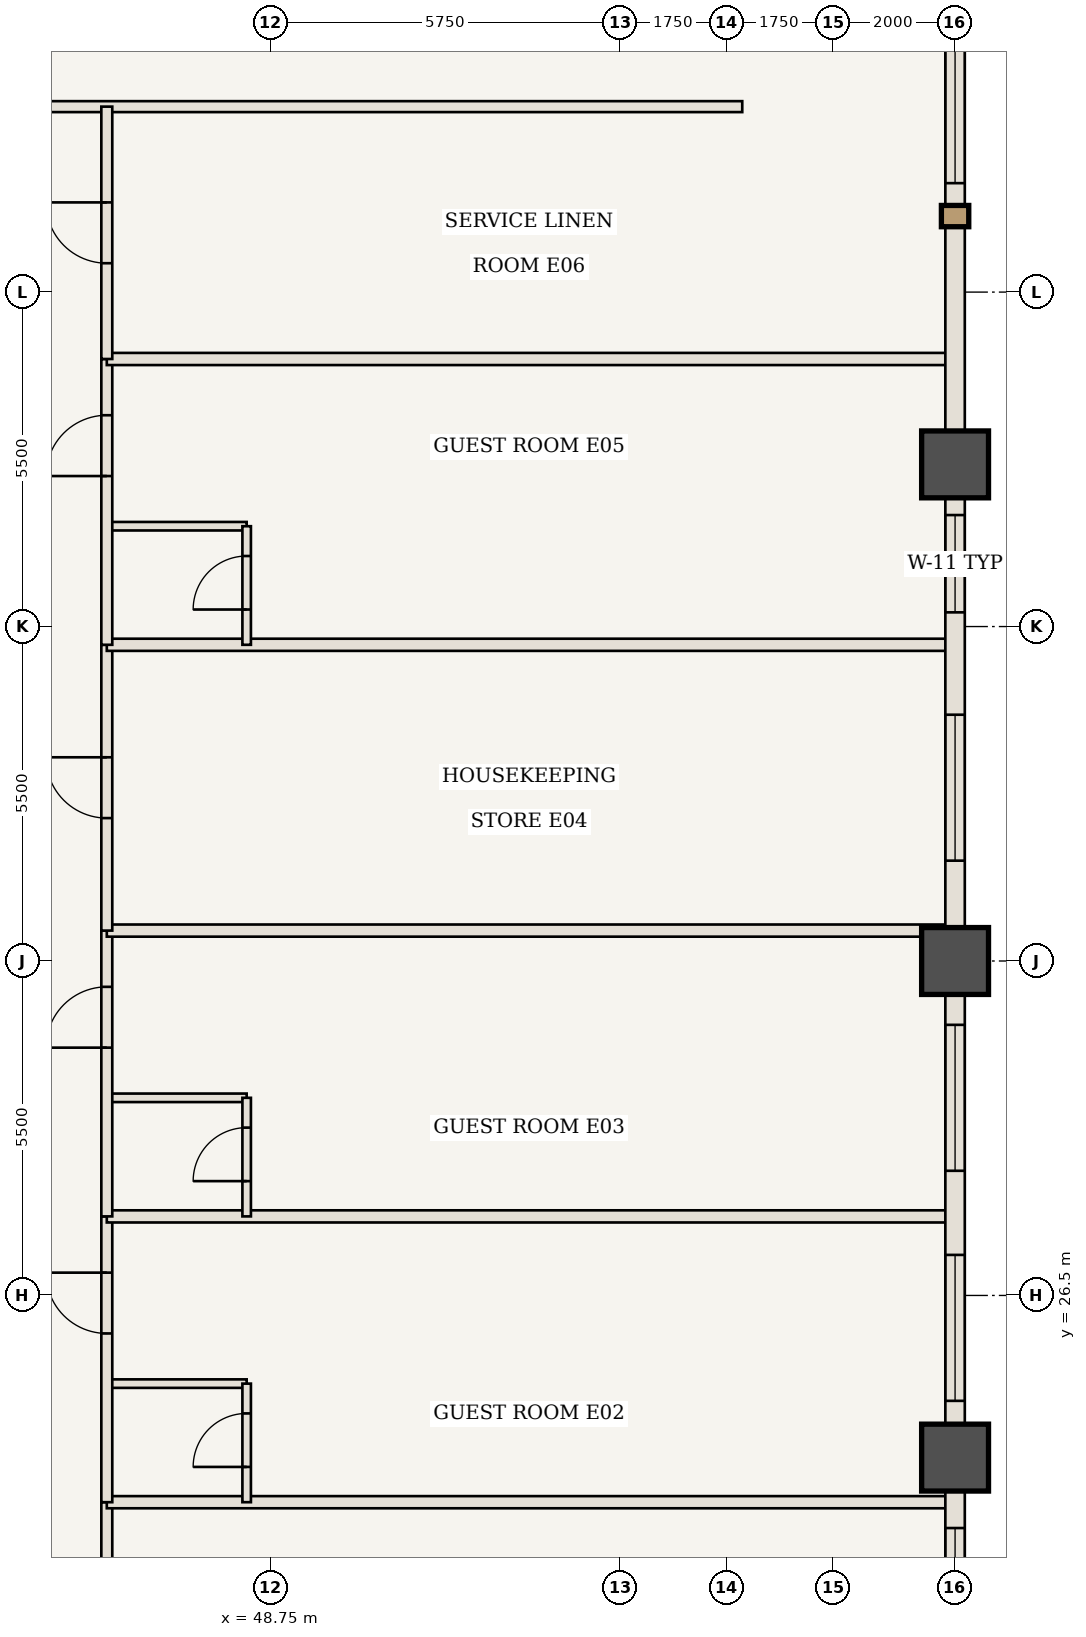
"""IFC4 building model, lengths in metres.
Left out: names, types, materials, properties, quantities, classifications, styles, units other than length and angle.
Written with IfcOpenShell. Run it as: python <this file> out.ifc"""

import sys

from ifc_helpers import new_model, si_unit, direction, frame, frame_2d, origin, origin_2d, place, context, subcontext, project, spatial, rectangle, extrude, element, fill, save


model = new_model("IFC4")
c1 = context("Model", 3, precision=1e-05, world=origin(), true_north=direction((0.0, 1.0)))
c2 = subcontext(c1, "Body", "Model", "MODEL_VIEW")
j1 = project(units=[si_unit("LENGTHUNIT", "METRE"), si_unit("PLANEANGLEUNIT", "RADIAN")], contexts=[c1])
p1 = place(None, origin())
s1 = spatial("IfcSite", under=j1, at=p1, CompositionType="ELEMENT")
p2 = place(p1, origin())
s2 = spatial("IfcBuilding", under=s1, at=p2, CompositionType="ELEMENT")
p3 = place(p2, frame((0.0, 0.0, 70.35)))
s3 = spatial("IfcBuildingStorey", under=s2, at=p3, CompositionType="ELEMENT", Elevation=70.35)
for number, where, z_axis, x_axis in (
    (1, (60.0, 23.833, 0.0), (0.0, 0.0, 1.0), (1.0, 0.0, 0.0)),
    (2, (60.0, 32.0, 0.0), (0.0, 0.0, 1.0), (1.0, 0.0, 0.0)),
    (3, (60.0, 40.167, 0.0), (0.0, 0.0, 1.0), (1.0, 0.0, 0.0)),
):
    element("IfcColumn", number, at=place(p3, frame(where, z_axis=z_axis, x_axis=x_axis)), inside=s3, PredefinedType="COLUMN", context=c2, shape_type="SweptSolid", body=[
        extrude(rectangle(XDim=1.1, YDim=1.1, at=origin_2d()), origin(), (0.0, 0.0, 1.0), 3.5),
    ])
p4 = place(p3, frame((33.8, 46.05, 0.0), z_axis=(0.0, 0.0, 1.0), x_axis=(1.0, 0.0, 0.0)))
e4 = element("IfcWall", 4, at=p4, inside=s3, PredefinedType="STANDARD", context=c2, shape_type="SweptSolid", body=[
    extrude(rectangle(XDim=22.7, YDim=0.18, at=frame_2d((11.35, 0.0))), origin(), (0.0, 0.0, 1.0), 3.32),
])
p5 = place(p4, frame((5.6, 0.0, 0.0)))
e5 = element("IfcOpeningElement", 5, at=p5, cuts=e4, PredefinedType="OPENING", context=c2, shape_type="SweptSolid", body=[
    extrude(rectangle(XDim=1.0, YDim=2.15, at=frame_2d((0.5, 1.075))), frame((0.0, 0.1, 0.0), z_axis=(0.0, -1.0, 0.0), x_axis=(1.0, 0.0, 0.0)), (0.0, 0.0, 1.0), 0.2),
])
p6 = place(p3, frame((46.05, 17.95, 0.0), z_axis=(0.0, 0.0, 1.0), x_axis=(0.0, 1.0, 0.0)))
e6 = element("IfcWall", 6, at=p6, inside=s3, PredefinedType="STANDARD", context=c2, shape_type="SweptSolid", body=[
    extrude(rectangle(XDim=5.15, YDim=0.18, at=frame_2d((2.575, 0.0))), origin(), (0.0, 0.0, 1.0), 3.32),
])
p7 = place(p6, frame((3.0, 0.0, 0.0)))
e7 = element("IfcOpeningElement", 7, at=p7, cuts=e6, PredefinedType="OPENING", context=c2, shape_type="SweptSolid", body=[
    extrude(rectangle(XDim=1.0, YDim=2.15, at=frame_2d((0.5, 1.075))), frame((0.0, 0.1, 0.0), z_axis=(0.0, -1.0, 0.0), x_axis=(1.0, 0.0, 0.0)), (0.0, 0.0, 1.0), 0.2),
])
p8 = place(p3, frame((46.05, 23.1, 0.0), z_axis=(0.0, 0.0, 1.0), x_axis=(1.0, 0.0, 0.0)))
e8 = element("IfcWall", 8, at=p8, inside=s3, PredefinedType="STANDARD", context=c2, shape_type="SweptSolid", body=[
    extrude(rectangle(XDim=13.89, YDim=0.2, at=frame_2d((6.945, 0.0))), origin(), (0.0, 0.0, 1.0), 3.32),
])
p9 = place(p3, frame((46.05, 25.05, 0.0), z_axis=(0.0, 0.0, 1.0), x_axis=(1.0, 0.0, 0.0)))
e9 = element("IfcWall", 9, at=p9, inside=s3, PredefinedType="STANDARD", context=c2, shape_type="SweptSolid", body=[
    extrude(rectangle(XDim=2.3, YDim=0.14, at=frame_2d((1.15, 0.0))), origin(), (0.0, 0.0, 1.0), 3.32),
])
p10 = place(p3, frame((48.35, 23.1, 0.0), z_axis=(0.0, 0.0, 1.0), x_axis=(0.0, 1.0, 0.0)))
e10 = element("IfcWall", 10, at=p10, inside=s3, PredefinedType="STANDARD", context=c2, shape_type="SweptSolid", body=[
    extrude(rectangle(XDim=1.95, YDim=0.14, at=frame_2d((0.975, 0.0))), origin(), (0.0, 0.0, 1.0), 3.32),
])
p11 = place(p10, frame((0.58, 0.0, 0.0)))
e11 = element("IfcOpeningElement", 11, at=p11, cuts=e10, PredefinedType="OPENING", context=c2, shape_type="SweptSolid", body=[
    extrude(rectangle(XDim=0.88, YDim=2.1, at=frame_2d((0.44, 1.05))), frame((0.0, 0.08, 0.0), z_axis=(0.0, -1.0, 0.0), x_axis=(1.0, 0.0, 0.0)), (0.0, 0.0, 1.0), 0.16),
])
p12 = place(p3, frame((46.05, 23.1, 0.0), z_axis=(0.0, 0.0, 1.0), x_axis=(0.0, 1.0, 0.0)))
e12 = element("IfcWall", 12, at=p12, inside=s3, PredefinedType="STANDARD", context=c2, shape_type="SweptSolid", body=[
    extrude(rectangle(XDim=4.7, YDim=0.18, at=frame_2d((2.35, 0.0))), origin(), (0.0, 0.0, 1.0), 3.32),
])
p13 = place(p12, frame((2.775, 0.0, 0.0)))
e13 = element("IfcOpeningElement", 13, at=p13, cuts=e12, PredefinedType="OPENING", context=c2, shape_type="SweptSolid", body=[
    extrude(rectangle(XDim=1.0, YDim=2.15, at=frame_2d((0.5, 1.075))), frame((0.0, 0.1, 0.0), z_axis=(0.0, -1.0, 0.0), x_axis=(1.0, 0.0, 0.0)), (0.0, 0.0, 1.0), 0.2),
])
p14 = place(p3, frame((46.05, 27.8, 0.0), z_axis=(0.0, 0.0, 1.0), x_axis=(1.0, 0.0, 0.0)))
e14 = element("IfcWall", 14, at=p14, inside=s3, PredefinedType="STANDARD", context=c2, shape_type="SweptSolid", body=[
    extrude(rectangle(XDim=13.89, YDim=0.2, at=frame_2d((6.945, 0.0))), origin(), (0.0, 0.0, 1.0), 3.32),
])
p15 = place(p3, frame((46.05, 29.75, 0.0), z_axis=(0.0, 0.0, 1.0), x_axis=(1.0, 0.0, 0.0)))
e15 = element("IfcWall", 15, at=p15, inside=s3, PredefinedType="STANDARD", context=c2, shape_type="SweptSolid", body=[
    extrude(rectangle(XDim=2.3, YDim=0.14, at=frame_2d((1.15, 0.0))), origin(), (0.0, 0.0, 1.0), 3.32),
])
p16 = place(p3, frame((48.35, 27.8, 0.0), z_axis=(0.0, 0.0, 1.0), x_axis=(0.0, 1.0, 0.0)))
e16 = element("IfcWall", 16, at=p16, inside=s3, PredefinedType="STANDARD", context=c2, shape_type="SweptSolid", body=[
    extrude(rectangle(XDim=1.95, YDim=0.14, at=frame_2d((0.975, 0.0))), origin(), (0.0, 0.0, 1.0), 3.32),
])
p17 = place(p16, frame((0.58, 0.0, 0.0)))
e17 = element("IfcOpeningElement", 17, at=p17, cuts=e16, PredefinedType="OPENING", context=c2, shape_type="SweptSolid", body=[
    extrude(rectangle(XDim=0.88, YDim=2.1, at=frame_2d((0.44, 1.05))), frame((0.0, 0.08, 0.0), z_axis=(0.0, -1.0, 0.0), x_axis=(1.0, 0.0, 0.0)), (0.0, 0.0, 1.0), 0.16),
])
p18 = place(p3, frame((46.05, 27.8, 0.0), z_axis=(0.0, 0.0, 1.0), x_axis=(0.0, 1.0, 0.0)))
e18 = element("IfcWall", 18, at=p18, inside=s3, PredefinedType="STANDARD", context=c2, shape_type="SweptSolid", body=[
    extrude(rectangle(XDim=4.7, YDim=0.18, at=frame_2d((2.35, 0.0))), origin(), (0.0, 0.0, 1.0), 3.32),
])
p19 = place(p18, frame((2.775, 0.0, 0.0)))
e19 = element("IfcOpeningElement", 19, at=p19, cuts=e18, PredefinedType="OPENING", context=c2, shape_type="SweptSolid", body=[
    extrude(rectangle(XDim=1.0, YDim=2.15, at=frame_2d((0.5, 1.075))), frame((0.0, 0.1, 0.0), z_axis=(0.0, -1.0, 0.0), x_axis=(1.0, 0.0, 0.0)), (0.0, 0.0, 1.0), 0.2),
])
p20 = place(p3, frame((46.05, 32.5, 0.0), z_axis=(0.0, 0.0, 1.0), x_axis=(1.0, 0.0, 0.0)))
e20 = element("IfcWall", 20, at=p20, inside=s3, PredefinedType="STANDARD", context=c2, shape_type="SweptSolid", body=[
    extrude(rectangle(XDim=13.89, YDim=0.2, at=frame_2d((6.945, 0.0))), origin(), (0.0, 0.0, 1.0), 3.32),
])
p21 = place(p3, frame((46.05, 32.5, 0.0), z_axis=(0.0, 0.0, 1.0), x_axis=(0.0, 1.0, 0.0)))
e21 = element("IfcWall", 21, at=p21, inside=s3, PredefinedType="STANDARD", context=c2, shape_type="SweptSolid", body=[
    extrude(rectangle(XDim=4.7, YDim=0.18, at=frame_2d((2.35, 0.0))), origin(), (0.0, 0.0, 1.0), 3.32),
])
p22 = place(p21, frame((1.85, 0.0, 0.0)))
e22 = element("IfcOpeningElement", 22, at=p22, cuts=e21, PredefinedType="OPENING", context=c2, shape_type="SweptSolid", body=[
    extrude(rectangle(XDim=1.0, YDim=2.15, at=frame_2d((0.5, 1.075))), frame((0.0, 0.1, 0.0), z_axis=(0.0, -1.0, 0.0), x_axis=(1.0, 0.0, 0.0)), (0.0, 0.0, 1.0), 0.2),
])
p23 = place(p3, frame((46.05, 37.2, 0.0), z_axis=(0.0, 0.0, 1.0), x_axis=(1.0, 0.0, 0.0)))
e23 = element("IfcWall", 23, at=p23, inside=s3, PredefinedType="STANDARD", context=c2, shape_type="SweptSolid", body=[
    extrude(rectangle(XDim=13.89, YDim=0.2, at=frame_2d((6.945, 0.0))), origin(), (0.0, 0.0, 1.0), 3.32),
])
p24 = place(p3, frame((46.05, 39.15, 0.0), z_axis=(0.0, 0.0, 1.0), x_axis=(1.0, 0.0, 0.0)))
e24 = element("IfcWall", 24, at=p24, inside=s3, PredefinedType="STANDARD", context=c2, shape_type="SweptSolid", body=[
    extrude(rectangle(XDim=2.3, YDim=0.14, at=frame_2d((1.15, 0.0))), origin(), (0.0, 0.0, 1.0), 3.32),
])
p25 = place(p3, frame((48.35, 37.2, 0.0), z_axis=(0.0, 0.0, 1.0), x_axis=(0.0, 1.0, 0.0)))
e25 = element("IfcWall", 25, at=p25, inside=s3, PredefinedType="STANDARD", context=c2, shape_type="SweptSolid", body=[
    extrude(rectangle(XDim=1.95, YDim=0.14, at=frame_2d((0.975, 0.0))), origin(), (0.0, 0.0, 1.0), 3.32),
])
p26 = place(p25, frame((0.58, 0.0, 0.0)))
e26 = element("IfcOpeningElement", 26, at=p26, cuts=e25, PredefinedType="OPENING", context=c2, shape_type="SweptSolid", body=[
    extrude(rectangle(XDim=0.88, YDim=2.1, at=frame_2d((0.44, 1.05))), frame((0.0, 0.08, 0.0), z_axis=(0.0, -1.0, 0.0), x_axis=(1.0, 0.0, 0.0)), (0.0, 0.0, 1.0), 0.16),
])
p27 = place(p3, frame((46.05, 37.2, 0.0), z_axis=(0.0, 0.0, 1.0), x_axis=(0.0, 1.0, 0.0)))
e27 = element("IfcWall", 27, at=p27, inside=s3, PredefinedType="STANDARD", context=c2, shape_type="SweptSolid", body=[
    extrude(rectangle(XDim=4.7, YDim=0.18, at=frame_2d((2.35, 0.0))), origin(), (0.0, 0.0, 1.0), 3.32),
])
p28 = place(p27, frame((2.775, 0.0, 0.0)))
e28 = element("IfcOpeningElement", 28, at=p28, cuts=e27, PredefinedType="OPENING", context=c2, shape_type="SweptSolid", body=[
    extrude(rectangle(XDim=1.0, YDim=2.15, at=frame_2d((0.5, 1.075))), frame((0.0, 0.1, 0.0), z_axis=(0.0, -1.0, 0.0), x_axis=(1.0, 0.0, 0.0)), (0.0, 0.0, 1.0), 0.2),
])
p29 = place(p3, frame((46.05, 41.9, 0.0), z_axis=(0.0, 0.0, 1.0), x_axis=(1.0, 0.0, 0.0)))
e29 = element("IfcWall", 29, at=p29, inside=s3, PredefinedType="STANDARD", context=c2, shape_type="SweptSolid", body=[
    extrude(rectangle(XDim=13.89, YDim=0.2, at=frame_2d((6.945, 0.0))), origin(), (0.0, 0.0, 1.0), 3.32),
])
p30 = place(p3, frame((46.05, 41.9, 0.0), z_axis=(0.0, 0.0, 1.0), x_axis=(0.0, 1.0, 0.0)))
e30 = element("IfcWall", 30, at=p30, inside=s3, PredefinedType="STANDARD", context=c2, shape_type="SweptSolid", body=[
    extrude(rectangle(XDim=4.15, YDim=0.18, at=frame_2d((2.075, 0.0))), origin(), (0.0, 0.0, 1.0), 3.32),
])
p31 = place(p30, frame((1.575, 0.0, 0.0)))
e31 = element("IfcOpeningElement", 31, at=p31, cuts=e30, PredefinedType="OPENING", context=c2, shape_type="SweptSolid", body=[
    extrude(rectangle(XDim=1.0, YDim=2.15, at=frame_2d((0.5, 1.075))), frame((0.0, 0.1, 0.0), z_axis=(0.0, -1.0, 0.0), x_axis=(1.0, 0.0, 0.0)), (0.0, 0.0, 1.0), 0.2),
])
p32 = place(p3, frame((60.0, 23.833, 0.0), z_axis=(0.0, 0.0, 1.0), x_axis=(0.0, -1.0, 0.0)))
e32 = element("IfcWall", 32, at=p32, inside=s3, PredefinedType="USERDEFINED", context=c2, shape_type="SweptSolid", body=[
    extrude(rectangle(XDim=8.167, YDim=0.32, at=frame_2d((4.083, 0.0))), origin(), (0.0, 0.0, 1.0), 2.52),
])
p33 = place(p32, frame((1.158, 0.0, 0.85)))
e33 = element("IfcOpeningElement", 33, at=p33, cuts=e32, PredefinedType="OPENING", context=c2, shape_type="SweptSolid", body=[
    extrude(rectangle(XDim=2.4, YDim=1.47, at=frame_2d((1.2, 0.735))), frame((0.0, 0.17, 0.0), z_axis=(0.0, -1.0, 0.0), x_axis=(1.0, 0.0, 0.0)), (0.0, 0.0, 1.0), 0.34),
])
p34 = place(p32, frame((4.625, 0.0, 0.85)))
e34 = element("IfcOpeningElement", 34, at=p34, cuts=e32, PredefinedType="OPENING", context=c2, shape_type="SweptSolid", body=[
    extrude(rectangle(XDim=2.8, YDim=1.47, at=frame_2d((1.4, 0.735))), frame((0.0, 0.17, 0.0), z_axis=(0.0, -1.0, 0.0), x_axis=(1.0, 0.0, 0.0)), (0.0, 0.0, 1.0), 0.34),
])
p35 = place(p3, frame((60.0, 32.0, 0.0), z_axis=(0.0, 0.0, 1.0), x_axis=(0.0, -1.0, 0.0)))
e35 = element("IfcWall", 35, at=p35, inside=s3, PredefinedType="USERDEFINED", context=c2, shape_type="SweptSolid", body=[
    extrude(rectangle(XDim=8.167, YDim=0.32, at=frame_2d((4.083, 0.0))), origin(), (0.0, 0.0, 1.0), 2.52),
])
p36 = place(p35, frame((1.05, 0.0, 0.85)))
e36 = element("IfcOpeningElement", 36, at=p36, cuts=e35, PredefinedType="OPENING", context=c2, shape_type="SweptSolid", body=[
    extrude(rectangle(XDim=2.4, YDim=1.47, at=frame_2d((1.2, 0.735))), frame((0.0, 0.17, 0.0), z_axis=(0.0, -1.0, 0.0), x_axis=(1.0, 0.0, 0.0)), (0.0, 0.0, 1.0), 0.34),
])
p37 = place(p35, frame((4.833, 0.0, 0.85)))
e37 = element("IfcOpeningElement", 37, at=p37, cuts=e35, PredefinedType="OPENING", context=c2, shape_type="SweptSolid", body=[
    extrude(rectangle(XDim=2.4, YDim=1.47, at=frame_2d((1.2, 0.735))), frame((0.0, 0.17, 0.0), z_axis=(0.0, -1.0, 0.0), x_axis=(1.0, 0.0, 0.0)), (0.0, 0.0, 1.0), 0.34),
])
p38 = place(p3, frame((60.0, 40.167, 0.0), z_axis=(0.0, 0.0, 1.0), x_axis=(0.0, -1.0, 0.0)))
e38 = element("IfcWall", 38, at=p38, inside=s3, PredefinedType="USERDEFINED", context=c2, shape_type="SweptSolid", body=[
    extrude(rectangle(XDim=8.167, YDim=0.32, at=frame_2d((4.083, 0.0))), origin(), (0.0, 0.0, 1.0), 2.52),
])
p39 = place(p38, frame((0.833, 0.0, 0.85)))
e39 = element("IfcOpeningElement", 39, at=p39, cuts=e38, PredefinedType="OPENING", context=c2, shape_type="SweptSolid", body=[
    extrude(rectangle(XDim=1.6, YDim=1.47, at=frame_2d((0.8, 0.735))), frame((0.0, 0.17, 0.0), z_axis=(0.0, -1.0, 0.0), x_axis=(1.0, 0.0, 0.0)), (0.0, 0.0, 1.0), 0.34),
])
p40 = place(p38, frame((4.117, 0.0, 0.85)))
e40 = element("IfcOpeningElement", 40, at=p40, cuts=e38, PredefinedType="OPENING", context=c2, shape_type="SweptSolid", body=[
    extrude(rectangle(XDim=2.4, YDim=1.47, at=frame_2d((1.2, 0.735))), frame((0.0, 0.17, 0.0), z_axis=(0.0, -1.0, 0.0), x_axis=(1.0, 0.0, 0.0)), (0.0, 0.0, 1.0), 0.34),
])
p41 = place(p3, frame((60.0, 48.333, 0.0), z_axis=(0.0, 0.0, 1.0), x_axis=(0.0, -1.0, 0.0)))
e41 = element("IfcWall", 41, at=p41, inside=s3, PredefinedType="USERDEFINED", context=c2, shape_type="SweptSolid", body=[
    extrude(rectangle(XDim=8.167, YDim=0.32, at=frame_2d((4.083, 0.0))), origin(), (0.0, 0.0, 1.0), 2.52),
])
p42 = place(p41, frame((0.742, 0.0, 0.85)))
e42 = element("IfcOpeningElement", 42, at=p42, cuts=e41, PredefinedType="OPENING", context=c2, shape_type="SweptSolid", body=[
    extrude(rectangle(XDim=2.8, YDim=1.47, at=frame_2d((1.4, 0.735))), frame((0.0, 0.17, 0.0), z_axis=(0.0, -1.0, 0.0), x_axis=(1.0, 0.0, 0.0)), (0.0, 0.0, 1.0), 0.34),
])
p43 = place(p11, origin())
e43 = element("IfcDoor", 43, at=p43, inside=s3, OperationType="SINGLE_SWING_LEFT", PredefinedType="DOOR", context=c2, shape_type="SweptSolid", body=[
    extrude(rectangle(XDim=0.88, YDim=2.1, at=frame_2d((0.44, 1.05))), frame((0.0, 0.025, 0.0), z_axis=(0.0, -1.0, 0.0), x_axis=(1.0, 0.0, 0.0)), (0.0, 0.0, 1.0), 0.05),
])
fill(e11, e43)
p44 = place(p13, origin())
e44 = element("IfcDoor", 44, at=p44, inside=s3, OperationType="SINGLE_SWING_RIGHT", PredefinedType="DOOR", context=c2, shape_type="SweptSolid", body=[
    extrude(rectangle(XDim=1.0, YDim=2.15, at=frame_2d((0.5, 1.075))), frame((0.0, 0.025, 0.0), z_axis=(0.0, -1.0, 0.0), x_axis=(1.0, 0.0, 0.0)), (0.0, 0.0, 1.0), 0.05),
])
fill(e13, e44)
p45 = place(p17, origin())
e45 = element("IfcDoor", 45, at=p45, inside=s3, OperationType="SINGLE_SWING_LEFT", PredefinedType="DOOR", context=c2, shape_type="SweptSolid", body=[
    extrude(rectangle(XDim=0.88, YDim=2.1, at=frame_2d((0.44, 1.05))), frame((0.0, 0.025, 0.0), z_axis=(0.0, -1.0, 0.0), x_axis=(1.0, 0.0, 0.0)), (0.0, 0.0, 1.0), 0.05),
])
fill(e17, e45)
p46 = place(p19, origin())
e46 = element("IfcDoor", 46, at=p46, inside=s3, OperationType="SINGLE_SWING_LEFT", PredefinedType="DOOR", context=c2, shape_type="SweptSolid", body=[
    extrude(rectangle(XDim=1.0, YDim=2.15, at=frame_2d((0.5, 1.075))), frame((0.0, 0.025, 0.0), z_axis=(0.0, -1.0, 0.0), x_axis=(1.0, 0.0, 0.0)), (0.0, 0.0, 1.0), 0.05),
])
fill(e19, e46)
p47 = place(p22, origin())
e47 = element("IfcDoor", 47, at=p47, inside=s3, OperationType="SINGLE_SWING_RIGHT", PredefinedType="DOOR", context=c2, shape_type="SweptSolid", body=[
    extrude(rectangle(XDim=1.0, YDim=2.15, at=frame_2d((0.5, 1.075))), frame((0.0, 0.025, 0.0), z_axis=(0.0, -1.0, 0.0), x_axis=(1.0, 0.0, 0.0)), (0.0, 0.0, 1.0), 0.05),
])
fill(e22, e47)
p48 = place(p26, origin())
e48 = element("IfcDoor", 48, at=p48, inside=s3, OperationType="SINGLE_SWING_LEFT", PredefinedType="DOOR", context=c2, shape_type="SweptSolid", body=[
    extrude(rectangle(XDim=0.88, YDim=2.1, at=frame_2d((0.44, 1.05))), frame((0.0, 0.025, 0.0), z_axis=(0.0, -1.0, 0.0), x_axis=(1.0, 0.0, 0.0)), (0.0, 0.0, 1.0), 0.05),
])
fill(e26, e48)
p49 = place(p28, origin())
e49 = element("IfcDoor", 49, at=p49, inside=s3, OperationType="SINGLE_SWING_LEFT", PredefinedType="DOOR", context=c2, shape_type="SweptSolid", body=[
    extrude(rectangle(XDim=1.0, YDim=2.15, at=frame_2d((0.5, 1.075))), frame((0.0, 0.025, 0.0), z_axis=(0.0, -1.0, 0.0), x_axis=(1.0, 0.0, 0.0)), (0.0, 0.0, 1.0), 0.05),
])
fill(e28, e49)
p50 = place(p31, origin())
e50 = element("IfcDoor", 50, at=p50, inside=s3, OperationType="SINGLE_SWING_RIGHT", PredefinedType="DOOR", context=c2, shape_type="SweptSolid", body=[
    extrude(rectangle(XDim=1.0, YDim=2.15, at=frame_2d((0.5, 1.075))), frame((0.0, 0.025, 0.0), z_axis=(0.0, -1.0, 0.0), x_axis=(1.0, 0.0, 0.0)), (0.0, 0.0, 1.0), 0.05),
])
fill(e31, e50)
p51 = place(p33, origin())
e51 = element("IfcWindow", 51, at=p51, inside=s3, PartitioningType="SINGLE_PANEL", PredefinedType="WINDOW", context=c2, shape_type="SweptSolid", body=[
    extrude(rectangle(XDim=2.4, YDim=1.47, at=frame_2d((1.2, 0.735))), frame((0.0, 0.03, 0.0), z_axis=(0.0, -1.0, 0.0), x_axis=(1.0, 0.0, 0.0)), (0.0, 0.0, 1.0), 0.06),
])
fill(e33, e51)
p52 = place(p36, origin())
e52 = element("IfcWindow", 52, at=p52, inside=s3, PartitioningType="SINGLE_PANEL", PredefinedType="WINDOW", context=c2, shape_type="SweptSolid", body=[
    extrude(rectangle(XDim=2.4, YDim=1.47, at=frame_2d((1.2, 0.735))), frame((0.0, 0.03, 0.0), z_axis=(0.0, -1.0, 0.0), x_axis=(1.0, 0.0, 0.0)), (0.0, 0.0, 1.0), 0.06),
])
fill(e36, e52)
p53 = place(p37, origin())
e53 = element("IfcWindow", 53, at=p53, inside=s3, PartitioningType="SINGLE_PANEL", PredefinedType="WINDOW", context=c2, shape_type="SweptSolid", body=[
    extrude(rectangle(XDim=2.4, YDim=1.47, at=frame_2d((1.2, 0.735))), frame((0.0, 0.03, 0.0), z_axis=(0.0, -1.0, 0.0), x_axis=(1.0, 0.0, 0.0)), (0.0, 0.0, 1.0), 0.06),
])
fill(e37, e53)
p54 = place(p39, origin())
e54 = element("IfcWindow", 54, at=p54, inside=s3, PartitioningType="SINGLE_PANEL", PredefinedType="WINDOW", context=c2, shape_type="SweptSolid", body=[
    extrude(rectangle(XDim=1.6, YDim=1.47, at=frame_2d((0.8, 0.735))), frame((0.0, 0.03, 0.0), z_axis=(0.0, -1.0, 0.0), x_axis=(1.0, 0.0, 0.0)), (0.0, 0.0, 1.0), 0.06),
])
fill(e39, e54)
p55 = place(p40, origin())
e55 = element("IfcWindow", 55, at=p55, inside=s3, PartitioningType="SINGLE_PANEL", PredefinedType="WINDOW", context=c2, shape_type="SweptSolid", body=[
    extrude(rectangle(XDim=2.4, YDim=1.47, at=frame_2d((1.2, 0.735))), frame((0.0, 0.03, 0.0), z_axis=(0.0, -1.0, 0.0), x_axis=(1.0, 0.0, 0.0)), (0.0, 0.0, 1.0), 0.06),
])
fill(e40, e55)
p56 = place(p42, origin())
e56 = element("IfcWindow", 56, at=p56, inside=s3, PartitioningType="SINGLE_PANEL", PredefinedType="WINDOW", context=c2, shape_type="SweptSolid", body=[
    extrude(rectangle(XDim=2.8, YDim=1.47, at=frame_2d((1.4, 0.735))), frame((0.0, 0.03, 0.0), z_axis=(0.0, -1.0, 0.0), x_axis=(1.0, 0.0, 0.0)), (0.0, 0.0, 1.0), 0.06),
])
fill(e42, e56)
save(model, sys.argv[1])
